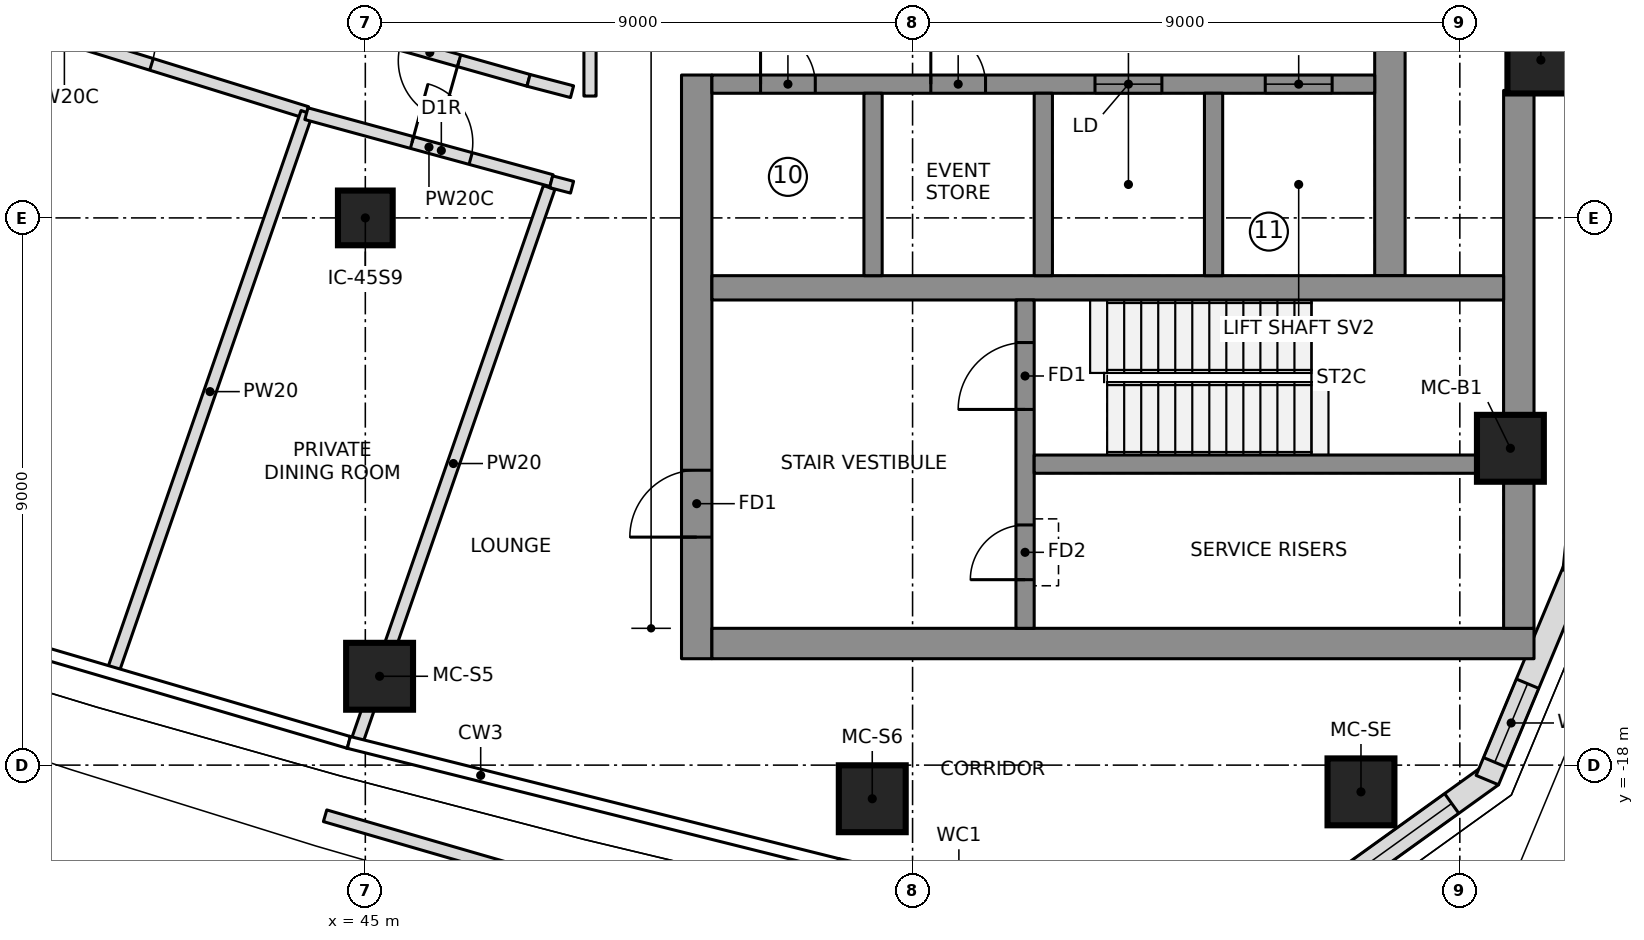
"""IFC4 building model, lengths in metres.
Left out: names, types, materials, properties, quantities, classifications, styles, units other than length and angle.
Written with IfcOpenShell. Run it as: python <this file> out.ifc"""

import sys

from ifc_helpers import new_model, si_unit, direction, frame, frame_2d, origin, origin_2d, place, context, subcontext, project, spatial, polyline, rectangle, outline, extrude, element, fill, save


model = new_model("IFC4")
c1 = context("Model", 3, precision=1e-05, world=origin(), true_north=direction((0.0, 1.0)))
c2 = subcontext(c1, "Body", "Model", "MODEL_VIEW")
j1 = project(units=[si_unit("LENGTHUNIT", "METRE"), si_unit("PLANEANGLEUNIT", "RADIAN")], contexts=[c1])
p1 = place(None, origin())
s1 = spatial("IfcSite", under=j1, at=p1, CompositionType="ELEMENT")
p2 = place(p1, origin())
s2 = spatial("IfcBuilding", under=s1, at=p2, CompositionType="ELEMENT")
p3 = place(p2, frame((0.0, 0.0, 263.3)))
s3 = spatial("IfcBuildingStorey", under=s2, at=p3, CompositionType="ELEMENT", Elevation=263.3)
p4 = place(p3, frame((50.45, -16.25, 0.0), z_axis=(0.0, 0.0, 1.0), x_axis=(0.0, 1.0, 0.0)))
e1 = element("IfcWall", 1, at=p4, inside=s3, PredefinedType="SHEAR", context=c2, shape_type="SweptSolid", body=[
    extrude(rectangle(XDim=9.6, YDim=0.5, at=frame_2d((4.8, 0.0))), origin(), (0.0, 0.0, 1.0), 4.6),
])
p5 = place(p4, frame((2.0, 0.0, 0.0)))
e2 = element("IfcOpeningElement", 2, at=p5, cuts=e1, PredefinedType="OPENING", context=c2, shape_type="SweptSolid", body=[
    extrude(rectangle(XDim=1.1, YDim=2.1, at=frame_2d((0.55, 1.05))), frame((0.0, 0.26, 0.0), z_axis=(0.0, -1.0, 0.0), x_axis=(1.0, 0.0, 0.0)), (0.0, 0.0, 1.0), 0.52),
])
p6 = place(p3, frame((50.7, -16.0, 0.0), z_axis=(0.0, 0.0, 1.0), x_axis=(1.0, 0.0, 0.0)))
e3 = element("IfcWall", 3, at=p6, inside=s3, PredefinedType="SHEAR", context=c2, shape_type="SweptSolid", body=[
    extrude(rectangle(XDim=13.52, YDim=0.5, at=frame_2d((6.76, 0.0))), origin(), (0.0, 0.0, 1.0), 4.6),
])
p7 = place(p3, frame((63.97, -15.75, 0.0), z_axis=(0.0, 0.0, 1.0), x_axis=(0.0, 1.0, 0.0)))
e4 = element("IfcWall", 4, at=p7, inside=s3, PredefinedType="SHEAR", context=c2, shape_type="SweptSolid", body=[
    extrude(rectangle(XDim=8.847, YDim=0.5, at=frame_2d((4.423, 0.0))), origin(), (0.0, 0.0, 1.0), 4.6),
])
p8 = place(p3, frame((61.85, -9.95, 0.0), z_axis=(0.0, 0.0, 1.0), x_axis=(0.0, 1.0, 0.0)))
e5 = element("IfcWall", 5, at=p8, inside=s3, PredefinedType="SHEAR", context=c2, shape_type="SweptSolid", body=[
    extrude(rectangle(XDim=19.9, YDim=0.5, at=frame_2d((9.95, 0.0))), origin(), (0.0, 0.0, 1.0), 4.6),
])
p9 = place(p3, frame((50.7, -10.15, 0.0), z_axis=(0.0, 0.0, 1.0), x_axis=(1.0, 0.0, 0.0)))
e6 = element("IfcWall", 6, at=p9, inside=s3, PredefinedType="SHEAR", context=c2, shape_type="SweptSolid", body=[
    extrude(rectangle(XDim=13.02, YDim=0.4, at=frame_2d((6.51, 0.0))), origin(), (0.0, 0.0, 1.0), 4.6),
])
p10 = place(p3, frame((50.7, -6.8, 0.0), z_axis=(0.0, 0.0, 1.0), x_axis=(1.0, 0.0, 0.0)))
e7 = element("IfcWall", 7, at=p10, inside=s3, PredefinedType="SHEAR", context=c2, shape_type="SweptSolid", body=[
    extrude(rectangle(XDim=10.9, YDim=0.3, at=frame_2d((5.45, 0.0))), origin(), (0.0, 0.0, 1.0), 4.6),
])
p11 = place(p10, frame((6.3, 0.0, 0.0)))
e8 = element("IfcOpeningElement", 8, at=p11, cuts=e7, PredefinedType="OPENING", context=c2, shape_type="SweptSolid", body=[
    extrude(rectangle(XDim=1.1, YDim=2.1, at=frame_2d((0.55, 1.05))), frame((0.0, 0.16, 0.0), z_axis=(0.0, -1.0, 0.0), x_axis=(1.0, 0.0, 0.0)), (0.0, 0.0, 1.0), 0.32),
])
p12 = place(p10, frame((9.1, 0.0, 0.0)))
e9 = element("IfcOpeningElement", 9, at=p12, cuts=e7, PredefinedType="OPENING", context=c2, shape_type="SweptSolid", body=[
    extrude(rectangle(XDim=1.1, YDim=2.1, at=frame_2d((0.55, 1.05))), frame((0.0, 0.16, 0.0), z_axis=(0.0, -1.0, 0.0), x_axis=(1.0, 0.0, 0.0)), (0.0, 0.0, 1.0), 0.32),
])
p13 = place(p10, frame((0.8, 0.0, 0.0)))
e10 = element("IfcOpeningElement", 10, at=p13, cuts=e7, PredefinedType="OPENING", context=c2, shape_type="SweptSolid", body=[
    extrude(rectangle(XDim=0.9, YDim=2.1, at=frame_2d((0.45, 1.05))), frame((0.0, 0.16, 0.0), z_axis=(0.0, -1.0, 0.0), x_axis=(1.0, 0.0, 0.0)), (0.0, 0.0, 1.0), 0.32),
])
p14 = place(p10, frame((3.6, 0.0, 0.0)))
e11 = element("IfcOpeningElement", 11, at=p14, cuts=e7, PredefinedType="OPENING", context=c2, shape_type="SweptSolid", body=[
    extrude(rectangle(XDim=0.9, YDim=2.1, at=frame_2d((0.45, 1.05))), frame((0.0, 0.16, 0.0), z_axis=(0.0, -1.0, 0.0), x_axis=(1.0, 0.0, 0.0)), (0.0, 0.0, 1.0), 0.32),
])
for number, where, z_axis, x_axis in (
    (12, (53.35, -9.95, 0.0), (0.0, 0.0, 1.0), (0.0, 1.0, 0.0)),
    (13, (56.15, -9.95, 0.0), (0.0, 0.0, 1.0), (0.0, 1.0, 0.0)),
    (14, (58.95, -9.95, 0.0), (0.0, 0.0, 1.0), (0.0, 1.0, 0.0)),
):
    element("IfcWall", number, at=place(p3, frame(where, z_axis=z_axis, x_axis=x_axis)), inside=s3, PredefinedType="SHEAR", context=c2, shape_type="SweptSolid", body=[
        extrude(rectangle(XDim=3.0, YDim=0.3, at=frame_2d((1.5, 0.0))), origin(), (0.0, 0.0, 1.0), 4.6),
    ])
p15 = place(p3, frame((55.85, -15.75, 0.0), z_axis=(0.0, 0.0, 1.0), x_axis=(0.0, 1.0, 0.0)))
e15 = element("IfcWall", 15, at=p15, inside=s3, PredefinedType="SHEAR", context=c2, shape_type="SweptSolid", body=[
    extrude(rectangle(XDim=5.4, YDim=0.3, at=frame_2d((2.7, 0.0))), origin(), (0.0, 0.0, 1.0), 4.6),
])
p16 = place(p15, frame((3.6, 0.0, 0.0)))
e16 = element("IfcOpeningElement", 16, at=p16, cuts=e15, PredefinedType="OPENING", context=c2, shape_type="SweptSolid", body=[
    extrude(rectangle(XDim=1.1, YDim=2.1, at=frame_2d((0.55, 1.05))), frame((0.0, 0.16, 0.0), z_axis=(0.0, -1.0, 0.0), x_axis=(1.0, 0.0, 0.0)), (0.0, 0.0, 1.0), 0.32),
])
p17 = place(p15, frame((0.8, 0.0, 0.0)))
e17 = element("IfcOpeningElement", 17, at=p17, cuts=e15, PredefinedType="OPENING", context=c2, shape_type="SweptSolid", body=[
    extrude(rectangle(XDim=0.9, YDim=2.1, at=frame_2d((0.45, 1.05))), frame((0.0, 0.16, 0.0), z_axis=(0.0, -1.0, 0.0), x_axis=(1.0, 0.0, 0.0)), (0.0, 0.0, 1.0), 0.32),
])
p18 = place(p3, frame((56.0, -13.05, 0.0), z_axis=(0.0, 0.0, 1.0), x_axis=(1.0, 0.0, 0.0)))
e18 = element("IfcWall", 18, at=p18, inside=s3, PredefinedType="SHEAR", context=c2, shape_type="SweptSolid", body=[
    extrude(rectangle(XDim=7.72, YDim=0.3, at=frame_2d((3.86, 0.0))), origin(), (0.0, 0.0, 1.0), 4.6),
])
for number, where, z_axis, x_axis in (
    (19, (45.235, -16.539, 0.0), (0.0, 0.0, 1.0), (1.0, 0.0, 0.0)),
    (20, (53.337, -18.553, 0.0), (0.0, 0.0, 1.0), (1.0, 0.0, 0.0)),
    (21, (61.374, -18.44, 0.0), (0.0, 0.0, 1.0), (1.0, 0.0, 0.0)),
    (22, (63.832, -12.789, 0.0), (0.0, 0.0, 1.0), (1.0, 0.0, 0.0)),
    (23, (64.333, -6.403, 0.0), (0.0, 0.0, 1.0), (1.0, 0.0, 0.0)),
):
    element("IfcColumn", number, at=place(p3, frame(where, z_axis=z_axis, x_axis=x_axis)), inside=s3, PredefinedType="COLUMN", context=c2, shape_type="SweptSolid", body=[
        extrude(rectangle(XDim=1.1, YDim=1.1, at=origin_2d()), origin(), (0.0, 0.0, 1.0), 4.6),
    ])
p19 = place(p3, frame((45.0, -9.0, 0.0), z_axis=(0.0, 0.0, 1.0), x_axis=(1.0, 0.0, 0.0)))
e24 = element("IfcColumn", 24, at=p19, inside=s3, PredefinedType="COLUMN", context=c2, shape_type="SweptSolid", body=[
    extrude(rectangle(XDim=0.9, YDim=0.9, at=origin_2d()), origin(), (0.0, 0.0, 1.0), 4.6),
])
p20 = place(p3, frame((52.738, -19.732, 0.0), z_axis=(0.0, 0.0, 1.0), x_axis=(0.977020225348, -0.213146614471, 0.0)))
e25 = element("IfcWall", 25, at=p20, inside=s3, PredefinedType="NOTDEFINED", context=c2, shape_type="SweptSolid", body=[
    extrude(outline(polyline([(0.0, -0.2), (4.171, -0.2), (4.113, 0.2), (0.0, 0.2), (0.0, -0.2)])), origin(), (0.0, 0.0, 1.0), 4.3),
])
p21 = place(p20, frame((1.171, 0.0, 1.8)))
e26 = element("IfcOpeningElement", 26, at=p21, cuts=e25, PredefinedType="OPENING", context=c2, shape_type="SweptSolid", body=[
    extrude(rectangle(XDim=1.8, YDim=1.2, at=frame_2d((0.9, 0.6))), frame((0.0, 0.21, 0.0), z_axis=(0.0, -1.0, 0.0), x_axis=(1.0, 0.0, 0.0)), (0.0, 0.0, 1.0), 0.42),
])
p22 = place(p3, frame((60.472, -20.352, 0.0), z_axis=(0.0, 0.0, 1.0), x_axis=(0.811962548682, 0.583709533533, 0.0)))
e27 = element("IfcWall", 27, at=p22, inside=s3, PredefinedType="NOTDEFINED", context=c2, shape_type="SweptSolid", body=[
    extrude(outline(polyline([(-0.057, -0.2), (3.753, -0.2), (3.64, 0.2), (0.057, 0.2), (-0.057, -0.2)])), origin(), (0.0, 0.0, 1.0), 4.3),
])
p23 = place(p22, frame((0.748, 0.0, 0.6)))
e28 = element("IfcOpeningElement", 28, at=p23, cuts=e27, PredefinedType="OPENING", context=c2, shape_type="SweptSolid", body=[
    extrude(outline(polyline([(0.0, 1.35), (0.084, 1.771), (0.322, 2.128), (0.679, 2.366), (1.1, 2.45), (1.521, 2.366), (1.878, 2.128), (2.116, 1.771), (2.2, 1.35), (2.2, 1.1), (2.116, 0.679), (1.878, 0.322), (1.521, 0.084), (1.1, 0.0), (0.679, 0.084), (0.322, 0.322), (0.084, 0.679), (0.0, 1.1), (0.0, 1.35)])), frame((0.0, 0.21, 0.0), z_axis=(0.0, -1.0, 0.0), x_axis=(1.0, 0.0, 0.0)), (0.0, 0.0, 1.0), 0.42),
])
p24 = place(p3, frame((63.474, -18.194, 0.0), z_axis=(0.0, 0.0, 1.0), x_axis=(0.385285857918, 0.922797273343, 0.0)))
e29 = element("IfcWall", 29, at=p24, inside=s3, PredefinedType="NOTDEFINED", context=c2, shape_type="SweptSolid", body=[
    extrude(outline(polyline([(-0.057, -0.2), (3.726, -0.2), (3.667, 0.2), (0.057, 0.2), (-0.057, -0.2)])), origin(), (0.0, 0.0, 1.0), 4.3),
])
p25 = place(p24, frame((0.261, 0.0, 0.6)))
e30 = element("IfcOpeningElement", 30, at=p25, cuts=e29, PredefinedType="OPENING", context=c2, shape_type="SweptSolid", body=[
    extrude(outline(polyline([(0.0, 1.75), (0.053, 2.018), (0.205, 2.245), (0.432, 2.397), (0.7, 2.45), (0.968, 2.397), (1.195, 2.245), (1.347, 2.018), (1.4, 1.75), (1.4, 0.7), (1.347, 0.432), (1.195, 0.205), (0.968, 0.053), (0.7, 0.0), (0.432, 0.053), (0.205, 0.205), (0.053, 0.432), (0.0, 0.7), (0.0, 1.75)])), frame((0.0, 0.21, 0.0), z_axis=(0.0, -1.0, 0.0), x_axis=(1.0, 0.0, 0.0)), (0.0, 0.0, 1.0), 0.42),
])
p26 = place(p3, frame((64.898, -14.782, 0.0), z_axis=(0.0, 0.0, 1.0), x_axis=(0.102249826987, 0.994758751096, 0.0)))
e31 = element("IfcWall", 31, at=p26, inside=s3, PredefinedType="NOTDEFINED", context=c2, shape_type="SweptSolid", body=[
    extrude(outline(polyline([(-0.03, -0.2), (4.237, -0.2), (4.23, 0.2), (0.03, 0.2), (-0.03, -0.2)])), origin(), (0.0, 0.0, 1.0), 4.3),
])
p27 = place(p26, frame((1.717, 0.0, 1.8)))
e32 = element("IfcOpeningElement", 32, at=p27, cuts=e31, PredefinedType="OPENING", context=c2, shape_type="SweptSolid", body=[
    extrude(rectangle(XDim=1.8, YDim=1.2, at=frame_2d((0.9, 0.6))), frame((0.0, 0.21, 0.0), z_axis=(0.0, -1.0, 0.0), x_axis=(1.0, 0.0, 0.0)), (0.0, 0.0, 1.0), 0.42),
])
p28 = place(p3, frame((44.338, -18.833, 0.0), z_axis=(0.0, 0.0, 1.0), x_axis=(0.960476446862, -0.278361267103, 0.0)))
e33 = element("IfcWall", 33, at=p28, inside=s3, PredefinedType="PARAPET", context=c2, shape_type="SweptSolid", body=[
    extrude(rectangle(XDim=4.223, YDim=0.2, at=frame_2d((2.112, 0.0))), origin(), (0.0, 0.0, 1.0), 1.1),
])
p29 = place(p3, frame((36.064, -4.794, 0.0), z_axis=(0.0, 0.0, 1.0), x_axis=(0.955129200503, -0.296189483855, 0.0)))
e34 = element("IfcWall", 34, at=p29, inside=s3, PredefinedType="PARTITIONING", context=c2, shape_type="SweptSolid", body=[
    extrude(rectangle(XDim=8.348, YDim=0.2, at=frame_2d((4.174, 0.0))), origin(), (0.0, 0.0, 1.0), 4.3),
])
p30 = place(p29, frame((3.674, 0.0, 0.0)))
e35 = element("IfcOpeningElement", 35, at=p30, cuts=e34, PredefinedType="OPENING", context=c2, shape_type="SweptSolid", body=[
    extrude(rectangle(XDim=2.0, YDim=2.4, at=frame_2d((1.0, 1.2))), frame((0.0, 0.11, 0.0), z_axis=(0.0, -1.0, 0.0), x_axis=(1.0, 0.0, 0.0)), (0.0, 0.0, 1.0), 0.22),
])
p31 = place(p3, frame((40.854, -16.447, 0.0), z_axis=(0.0, 0.0, 1.0), x_axis=(0.327714576096, 0.944776776077, 0.0)))
e36 = element("IfcWall", 36, at=p31, inside=s3, PredefinedType="PARTITIONING", context=c2, shape_type="SweptSolid", body=[
    extrude(rectangle(XDim=9.717, YDim=0.2, at=frame_2d((4.858, 0.0))), origin(), (0.0, 0.0, 1.0), 4.3),
])
p32 = place(p3, frame((44.031, -7.286, 0.0), z_axis=(0.0, 0.0, 1.0), x_axis=(0.964708521199, -0.263320088726, 0.0)))
e37 = element("IfcWall", 37, at=p32, inside=s3, PredefinedType="PARTITIONING", context=c2, shape_type="SweptSolid", body=[
    extrude(rectangle(XDim=4.179, YDim=0.2, at=frame_2d((2.089, 0.0))), origin(), (0.0, 0.0, 1.0), 4.3),
])
p33 = place(p32, frame((1.8, 0.0, 0.0)))
e38 = element("IfcOpeningElement", 38, at=p33, cuts=e37, PredefinedType="OPENING", context=c2, shape_type="SweptSolid", body=[
    extrude(rectangle(XDim=1.0, YDim=2.1, at=frame_2d((0.5, 1.05))), frame((0.0, 0.11, 0.0), z_axis=(0.0, -1.0, 0.0), x_axis=(1.0, 0.0, 0.0)), (0.0, 0.0, 1.0), 0.22),
])
p34 = place(p3, frame((44.874, -17.579, 0.0), z_axis=(0.0, 0.0, 1.0), x_axis=(0.327705598625, 0.944779890043, 0.0)))
e39 = element("IfcWall", 39, at=p34, inside=s3, PredefinedType="PARTITIONING", context=c2, shape_type="SweptSolid", body=[
    extrude(rectangle(XDim=9.61, YDim=0.2, at=frame_2d((4.805, 0.0))), origin(), (0.0, 0.0, 1.0), 4.3),
])
p35 = place(p3, frame((47.684, -6.738, 0.0), z_axis=(0.0, 0.0, 1.0), x_axis=(-0.962403613575, 0.271623424206, 0.0)))
e40 = element("IfcWall", 40, at=p35, inside=s3, PredefinedType="PARTITIONING", context=c2, shape_type="SweptSolid", body=[
    extrude(rectangle(XDim=3.374, YDim=0.2, at=frame_2d((1.687, 0.0))), origin(), (0.0, 0.0, 1.0), 4.3),
])
p36 = place(p35, frame((1.187, 0.0, 0.0)))
e41 = element("IfcOpeningElement", 41, at=p36, cuts=e40, PredefinedType="OPENING", context=c2, shape_type="SweptSolid", body=[
    extrude(rectangle(XDim=1.0, YDim=2.1, at=frame_2d((0.5, 1.05))), frame((0.0, 0.11, 0.0), z_axis=(0.0, -1.0, 0.0), x_axis=(1.0, 0.0, 0.0)), (0.0, 0.0, 1.0), 0.22),
])
p37 = place(p3, frame((48.056, -8.405, 0.0), z_axis=(0.0, 0.0, 1.0), x_axis=(0.96754430933, -0.252701423587, 0.0)))
e42 = element("IfcWall", 42, at=p37, inside=s3, PredefinedType="PARTITIONING", context=c2, shape_type="SweptSolid", body=[
    extrude(rectangle(XDim=0.355, YDim=0.2, at=frame_2d((0.178, 0.0))), origin(), (0.0, 0.0, 1.0), 4.3),
])
p38 = place(p3, frame((48.4, -6.924, 0.0), z_axis=(0.0, 0.0, 1.0), x_axis=(-0.967585713416, 0.252542842294, 0.0)))
e43 = element("IfcWall", 43, at=p38, inside=s3, PredefinedType="PARTITIONING", context=c2, shape_type="SweptSolid", body=[
    extrude(rectangle(XDim=0.74, YDim=0.2, at=frame_2d((0.37, 0.0))), origin(), (0.0, 0.0, 1.0), 4.3),
])
p39 = place(p3, frame((48.695, 6.996, 0.0), z_axis=(0.0, 0.0, 1.0), x_axis=(0.0, -1.0, 0.0)))
e44 = element("IfcWall", 44, at=p39, inside=s3, PredefinedType="PARTITIONING", context=c2, shape_type="SweptSolid", body=[
    extrude(rectangle(XDim=13.992, YDim=0.2, at=frame_2d((6.996, 0.0))), origin(), (0.0, 0.0, 1.0), 4.3),
])
p40 = place(p23, origin())
e45 = element("IfcWindow", 45, at=p40, inside=s3, PartitioningType="SINGLE_PANEL", PredefinedType="WINDOW", context=c2, shape_type="SweptSolid", body=[
    extrude(outline(polyline([(0.0, 1.35), (0.084, 1.771), (0.322, 2.128), (0.679, 2.366), (1.1, 2.45), (1.521, 2.366), (1.878, 2.128), (2.116, 1.771), (2.2, 1.35), (2.2, 1.1), (2.116, 0.679), (1.878, 0.322), (1.521, 0.084), (1.1, 0.0), (0.679, 0.084), (0.322, 0.322), (0.084, 0.679), (0.0, 1.1), (0.0, 1.35)])), frame((0.0, 0.17, 0.0), z_axis=(0.0, -1.0, 0.0), x_axis=(1.0, 0.0, 0.0)), (0.0, 0.0, 1.0), 0.06),
])
fill(e28, e45)
p41 = place(p25, origin())
e46 = element("IfcWindow", 46, at=p41, inside=s3, PartitioningType="SINGLE_PANEL", PredefinedType="WINDOW", context=c2, shape_type="SweptSolid", body=[
    extrude(outline(polyline([(0.0, 1.75), (0.053, 2.018), (0.205, 2.245), (0.432, 2.397), (0.7, 2.45), (0.968, 2.397), (1.195, 2.245), (1.347, 2.018), (1.4, 1.75), (1.4, 0.7), (1.347, 0.432), (1.195, 0.205), (0.968, 0.053), (0.7, 0.0), (0.432, 0.053), (0.205, 0.205), (0.053, 0.432), (0.0, 0.7), (0.0, 1.75)])), frame((0.0, 0.17, 0.0), z_axis=(0.0, -1.0, 0.0), x_axis=(1.0, 0.0, 0.0)), (0.0, 0.0, 1.0), 0.06),
])
fill(e30, e46)
p42 = place(p30, origin())
e47 = element("IfcDoor", 47, at=p42, inside=s3, OperationType="DOUBLE_DOOR_SINGLE_SWING", PredefinedType="DOOR", context=c2, shape_type="SweptSolid", body=[
    extrude(rectangle(XDim=2.0, YDim=2.4, at=frame_2d((1.0, 1.2))), frame((0.0, 0.025, 0.0), z_axis=(0.0, -1.0, 0.0), x_axis=(1.0, 0.0, 0.0)), (0.0, 0.0, 1.0), 0.05),
])
fill(e35, e47)
p43 = place(p33, origin())
e48 = element("IfcDoor", 48, at=p43, inside=s3, OperationType="SINGLE_SWING_RIGHT", PredefinedType="DOOR", context=c2, shape_type="SweptSolid", body=[
    extrude(rectangle(XDim=1.0, YDim=2.1, at=frame_2d((0.5, 1.05))), frame((0.0, 0.025, 0.0), z_axis=(0.0, -1.0, 0.0), x_axis=(1.0, 0.0, 0.0)), (0.0, 0.0, 1.0), 0.05),
])
fill(e38, e48)
p44 = place(p36, origin())
e49 = element("IfcDoor", 49, at=p44, inside=s3, OperationType="SINGLE_SWING_RIGHT", PredefinedType="DOOR", context=c2, shape_type="SweptSolid", body=[
    extrude(rectangle(XDim=1.0, YDim=2.1, at=frame_2d((0.5, 1.05))), frame((0.0, 0.025, 0.0), z_axis=(0.0, -1.0, 0.0), x_axis=(1.0, 0.0, 0.0)), (0.0, 0.0, 1.0), 0.05),
])
fill(e41, e49)
p45 = place(p11, origin())
e50 = element("IfcDoor", 50, at=p45, inside=s3, OperationType="DOUBLE_DOOR_SLIDING", PredefinedType="DOOR", context=c2, shape_type="SweptSolid", body=[
    extrude(rectangle(XDim=1.1, YDim=2.1, at=frame_2d((0.55, 1.05))), frame((0.0, 0.025, 0.0), z_axis=(0.0, -1.0, 0.0), x_axis=(1.0, 0.0, 0.0)), (0.0, 0.0, 1.0), 0.05),
])
fill(e8, e50)
p46 = place(p12, origin())
e51 = element("IfcDoor", 51, at=p46, inside=s3, OperationType="DOUBLE_DOOR_SLIDING", PredefinedType="DOOR", context=c2, shape_type="SweptSolid", body=[
    extrude(rectangle(XDim=1.1, YDim=2.1, at=frame_2d((0.55, 1.05))), frame((0.0, 0.025, 0.0), z_axis=(0.0, -1.0, 0.0), x_axis=(1.0, 0.0, 0.0)), (0.0, 0.0, 1.0), 0.05),
])
fill(e9, e51)
p47 = place(p16, origin())
e52 = element("IfcDoor", 52, at=p47, inside=s3, OperationType="SINGLE_SWING_RIGHT", PredefinedType="DOOR", context=c2, shape_type="SweptSolid", body=[
    extrude(rectangle(XDim=1.1, YDim=2.1, at=frame_2d((0.55, 1.05))), frame((0.0, 0.025, 0.0), z_axis=(0.0, -1.0, 0.0), x_axis=(1.0, 0.0, 0.0)), (0.0, 0.0, 1.0), 0.05),
])
fill(e16, e52)
p48 = place(p5, origin())
e53 = element("IfcDoor", 53, at=p48, inside=s3, OperationType="SINGLE_SWING_RIGHT", PredefinedType="DOOR", context=c2, shape_type="SweptSolid", body=[
    extrude(rectangle(XDim=1.1, YDim=2.1, at=frame_2d((0.55, 1.05))), frame((0.0, 0.025, 0.0), z_axis=(0.0, -1.0, 0.0), x_axis=(1.0, 0.0, 0.0)), (0.0, 0.0, 1.0), 0.05),
])
fill(e2, e53)
p49 = place(p17, origin())
e54 = element("IfcDoor", 54, at=p49, inside=s3, OperationType="SINGLE_SWING_LEFT", PredefinedType="DOOR", context=c2, shape_type="SweptSolid", body=[
    extrude(rectangle(XDim=0.9, YDim=2.1, at=frame_2d((0.45, 1.05))), frame((0.0, 0.025, 0.0), z_axis=(0.0, -1.0, 0.0), x_axis=(1.0, 0.0, 0.0)), (0.0, 0.0, 1.0), 0.05),
])
fill(e17, e54)
p50 = place(p13, origin())
e55 = element("IfcDoor", 55, at=p50, inside=s3, OperationType="SINGLE_SWING_LEFT", PredefinedType="DOOR", context=c2, shape_type="SweptSolid", body=[
    extrude(rectangle(XDim=0.9, YDim=2.1, at=frame_2d((0.45, 1.05))), frame((0.0, 0.025, 0.0), z_axis=(0.0, -1.0, 0.0), x_axis=(1.0, 0.0, 0.0)), (0.0, 0.0, 1.0), 0.05),
])
fill(e10, e55)
p51 = place(p14, origin())
e56 = element("IfcDoor", 56, at=p51, inside=s3, OperationType="SINGLE_SWING_LEFT", PredefinedType="DOOR", context=c2, shape_type="SweptSolid", body=[
    extrude(rectangle(XDim=0.9, YDim=2.1, at=frame_2d((0.45, 1.05))), frame((0.0, 0.025, 0.0), z_axis=(0.0, -1.0, 0.0), x_axis=(1.0, 0.0, 0.0)), (0.0, 0.0, 1.0), 0.05),
])
fill(e11, e56)
save(model, sys.argv[1])
